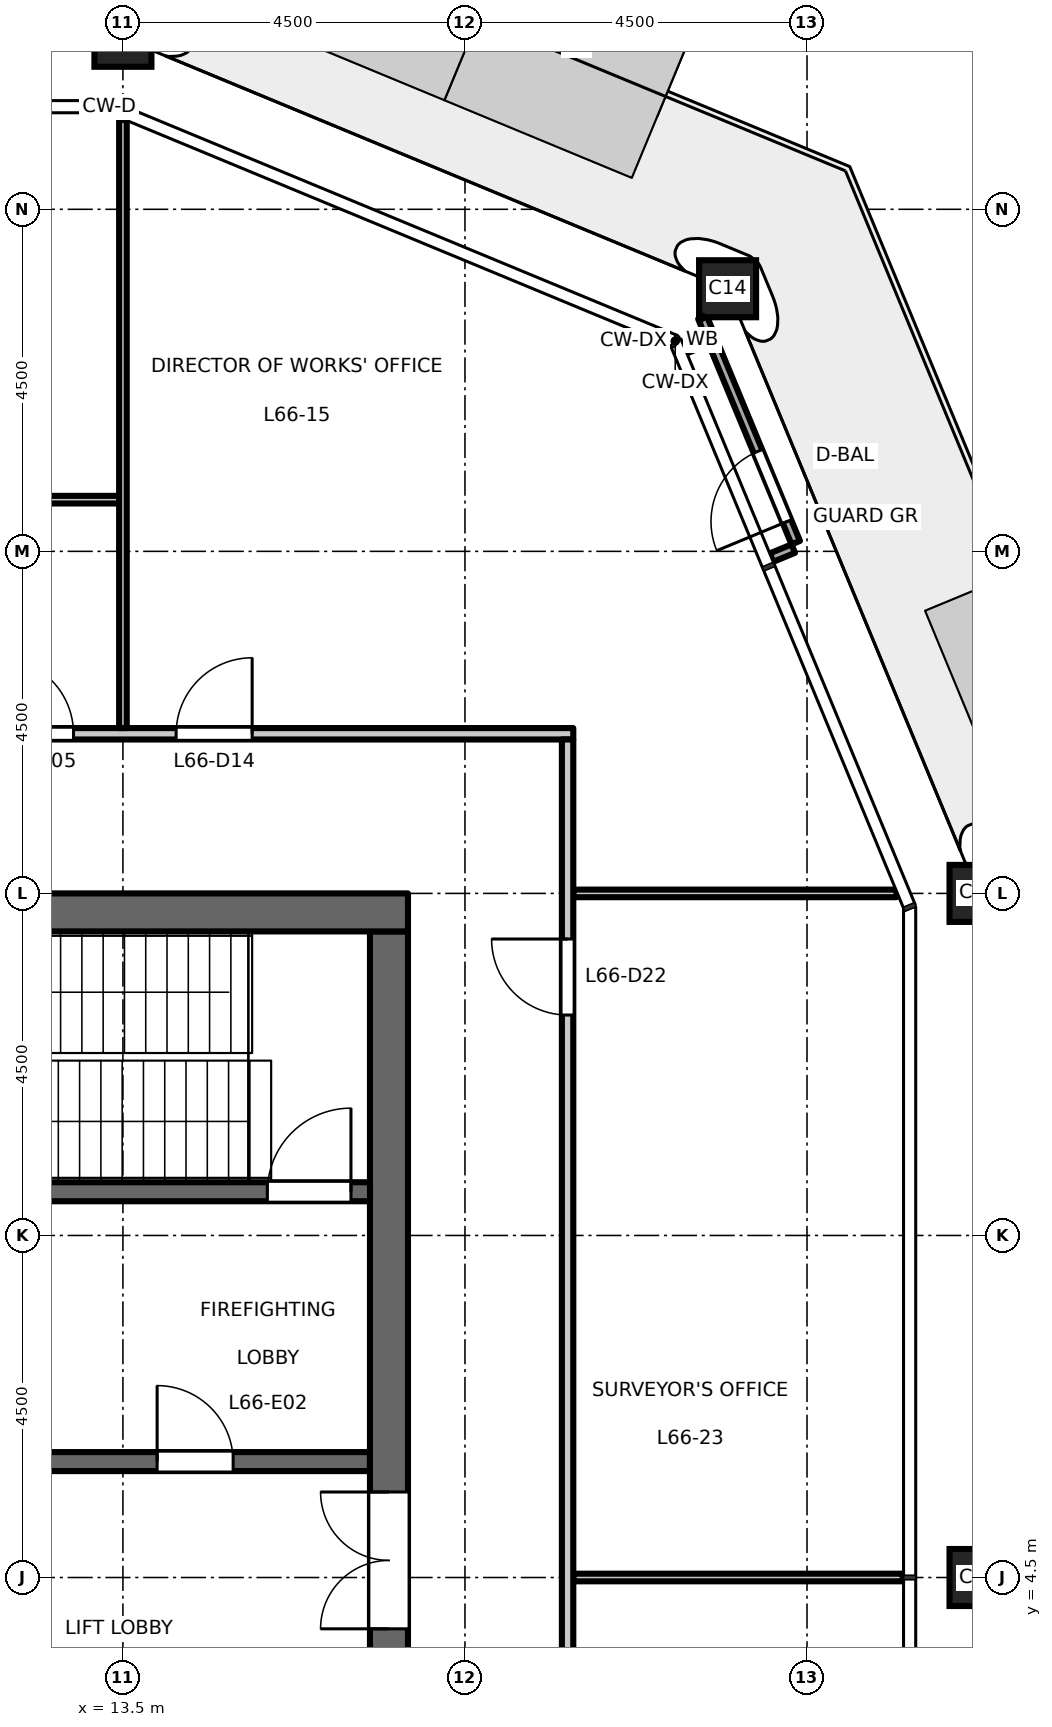
"""IFC4 building model, lengths in metres.
Left out: names, types, materials, properties, quantities, classifications, styles, units other than length and angle.
Written with IfcOpenShell. Run it as: python <this file> out.ifc"""

import sys

from ifc_helpers import new_model, si_unit, direction, frame, frame_2d, origin, origin_2d, place, context, subcontext, project, spatial, rectangle, hollow_rectangle, extrude, element, fill, save


model = new_model("IFC4")
c1 = context("Model", 3, precision=1e-05, world=origin(), true_north=direction((0.0, 1.0)))
c2 = subcontext(c1, "Body", "Model", "MODEL_VIEW")
j1 = project(units=[si_unit("LENGTHUNIT", "METRE"), si_unit("PLANEANGLEUNIT", "RADIAN")], contexts=[c1])
p1 = place(None, origin())
s1 = spatial("IfcSite", under=j1, at=p1, CompositionType="ELEMENT")
p2 = place(p1, origin())
s2 = spatial("IfcBuilding", under=s1, at=p2, CompositionType="ELEMENT")
p3 = place(p2, frame((0.0, 0.0, 307.7)))
s3 = spatial("IfcBuildingStorey", under=s2, at=p3, CompositionType="ELEMENT", Elevation=307.7)
for number, where, z_axis, x_axis in (
    (1, (24.75, 4.5, 0.0), (0.0, 0.0, 1.0), (1.0, 0.0, 0.0)),
    (2, (24.75, 13.5, 0.0), (0.0, 0.0, 1.0), (1.0, 0.0, 0.0)),
    (3, (21.455, 21.455, 0.0), (0.0, 0.0, 1.0), (1.0, 0.0, 0.0)),
    (4, (13.5, 24.75, 0.0), (0.0, 0.0, 1.0), (1.0, 0.0, 0.0)),
):
    element("IfcColumn", number, at=place(p3, frame(where, z_axis=z_axis, x_axis=x_axis)), inside=s3, PredefinedType="COLUMN", context=c2, shape_type="SweptSolid", body=[
        extrude(hollow_rectangle(XDim=0.75, YDim=0.75, WallThickness=0.04, at=origin_2d()), origin(), (0.0, 0.0, 1.0), 4.5),
    ])
p4 = place(p3, frame((12.15, 6.025, 0.0), z_axis=(0.0, 0.0, 1.0), x_axis=(1.0, 0.0, 0.0)))
e5 = element("IfcWall", 5, at=p4, inside=s3, PredefinedType="SHEAR", context=c2, shape_type="SweptSolid", body=[
    extrude(rectangle(XDim=4.6, YDim=0.25, at=frame_2d((2.3, 0.0))), origin(), (0.0, 0.0, 1.0), 4.35),
])
p5 = place(p4, frame((1.8, 0.0, 0.0)))
e6 = element("IfcOpeningElement", 6, at=p5, cuts=e5, PredefinedType="OPENING", context=c2, shape_type="SweptSolid", body=[
    extrude(rectangle(XDim=1.0, YDim=2.1, at=frame_2d((0.5, 1.05))), frame((0.0, 0.135, 0.0), z_axis=(0.0, -1.0, 0.0), x_axis=(1.0, 0.0, 0.0)), (0.0, 0.0, 1.0), 0.27),
])
p6 = place(p3, frame((17.0, -13.0, 0.0), z_axis=(0.0, 0.0, 1.0), x_axis=(0.0, 1.0, 0.0)))
e7 = element("IfcWall", 7, at=p6, inside=s3, PredefinedType="SHEAR", context=c2, shape_type="SweptSolid", body=[
    extrude(rectangle(XDim=26.0, YDim=0.5, at=frame_2d((13.0, 0.0))), origin(), (0.0, 0.0, 1.0), 4.35),
])
p7 = place(p6, frame((16.825, 0.0, 0.0)))
e8 = element("IfcOpeningElement", 8, at=p7, cuts=e7, PredefinedType="OPENING", context=c2, shape_type="SweptSolid", body=[
    extrude(rectangle(XDim=1.8, YDim=2.1, at=frame_2d((0.9, 1.05))), frame((0.0, 0.26, 0.0), z_axis=(0.0, -1.0, 0.0), x_axis=(1.0, 0.0, 0.0)), (0.0, 0.0, 1.0), 0.52),
])
p8 = place(p6, frame((7.375, 0.0, 0.0)))
e9 = element("IfcOpeningElement", 9, at=p8, cuts=e7, PredefinedType="OPENING", context=c2, shape_type="SweptSolid", body=[
    extrude(rectangle(XDim=1.8, YDim=2.1, at=frame_2d((0.9, 1.05))), frame((0.0, 0.26, 0.0), z_axis=(0.0, -1.0, 0.0), x_axis=(1.0, 0.0, 0.0)), (0.0, 0.0, 1.0), 0.52),
])
p9 = place(p3, frame((8.75, 9.575, 0.0), z_axis=(0.0, 0.0, 1.0), x_axis=(1.0, 0.0, 0.0)))
e10 = element("IfcWall", 10, at=p9, inside=s3, PredefinedType="SHEAR", context=c2, shape_type="SweptSolid", body=[
    extrude(rectangle(XDim=8.0, YDim=0.25, at=frame_2d((4.0, 0.0))), origin(), (0.0, 0.0, 1.0), 4.35),
])
p10 = place(p9, frame((6.65, 0.0, 0.0)))
e11 = element("IfcOpeningElement", 11, at=p10, cuts=e10, PredefinedType="OPENING", context=c2, shape_type="SweptSolid", body=[
    extrude(rectangle(XDim=1.1, YDim=2.1, at=frame_2d((0.55, 1.05))), frame((0.0, 0.135, 0.0), z_axis=(0.0, -1.0, 0.0), x_axis=(1.0, 0.0, 0.0)), (0.0, 0.0, 1.0), 0.27),
])
p11 = place(p3, frame((8.25, 13.25, 0.0), z_axis=(0.0, 0.0, 1.0), x_axis=(1.0, 0.0, 0.0)))
e12 = element("IfcWall", 12, at=p11, inside=s3, PredefinedType="SHEAR", context=c2, shape_type="SweptSolid", body=[
    extrude(rectangle(XDim=9.0, YDim=0.5, at=frame_2d((4.5, 0.0))), origin(), (0.0, 0.0, 1.0), 4.35),
])
p12 = place(p3, frame((22.033, 17.917, 0.0), z_axis=(0.0, 0.0, 1.0), x_axis=(0.923844027884, 0.382769136873, 0.0)))
e13 = element("IfcWall", 13, at=p12, inside=s3, PredefinedType="STANDARD", context=c2, shape_type="SweptSolid", body=[
    extrude(rectangle(XDim=0.31, YDim=0.12, at=frame_2d((0.155, 0.0))), origin(), (0.0, 0.0, 1.0), 4.35),
])
p13 = place(p3, frame((20.896, 20.66, 0.0), z_axis=(0.0, 0.0, 1.0), x_axis=(0.923959293734, 0.382490814953, 0.0)))
e14 = element("IfcWall", 14, at=p13, inside=s3, PredefinedType="STANDARD", context=c2, shape_type="SweptSolid", body=[
    extrude(rectangle(XDim=0.31, YDim=0.12, at=frame_2d((0.155, 0.0))), origin(), (0.0, 0.0, 1.0), 4.35),
])
p14 = place(p3, frame((22.352, 18.115, 0.0), z_axis=(0.0, 0.0, 1.0), x_axis=(-0.382680969843, 0.923880552517, 0.0)))
e15 = element("IfcWall", 15, at=p14, inside=s3, PredefinedType="STANDARD", context=c2, shape_type="SweptSolid", body=[
    extrude(rectangle(XDim=3.21, YDim=0.12, at=frame_2d((1.605, 0.0))), origin(), (0.0, 0.0, 1.0), 4.35),
])
p15 = place(p14, frame((0.3, 0.0, 0.0)))
e16 = element("IfcOpeningElement", 16, at=p15, cuts=e15, PredefinedType="OPENING", context=c2, shape_type="SweptSolid", body=[
    extrude(rectangle(XDim=1.0, YDim=2.4, at=frame_2d((0.5, 1.2))), frame((0.0, 0.07, 0.0), z_axis=(0.0, -1.0, 0.0), x_axis=(1.0, 0.0, 0.0)), (0.0, 0.0, 1.0), 0.14),
])
p16 = place(p3, frame((19.425, 4.5, 0.0), z_axis=(0.0, 0.0, 1.0), x_axis=(1.0, 0.0, 0.0)))
e17 = element("IfcWall", 17, at=p16, inside=s3, PredefinedType="PARTITIONING", context=c2, shape_type="SweptSolid", body=[
    extrude(rectangle(XDim=4.335, YDim=0.1, at=frame_2d((2.167, 0.0))), origin(), (0.0, 0.0, 1.0), 4.35),
])
p17 = place(p3, frame((19.425, 13.5, 0.0), z_axis=(0.0, 0.0, 1.0), x_axis=(1.0, 0.0, 0.0)))
e18 = element("IfcWall", 18, at=p17, inside=s3, PredefinedType="PARTITIONING", context=c2, shape_type="SweptSolid", body=[
    extrude(rectangle(XDim=4.253, YDim=0.1, at=frame_2d((2.126, 0.0))), origin(), (0.0, 0.0, 1.0), 4.35),
])
p18 = place(p3, frame((-19.425, 15.6, 0.0), z_axis=(0.0, 0.0, 1.0), x_axis=(1.0, 0.0, 0.0)))
e19 = element("IfcWall", 19, at=p18, inside=s3, PredefinedType="PARTITIONING", context=c2, shape_type="SweptSolid", body=[
    extrude(rectangle(XDim=38.85, YDim=0.15, at=frame_2d((19.425, 0.0))), origin(), (0.0, 0.0, 1.0), 4.35),
])
p19 = place(p18, frame((13.275, 0.0, 0.0)))
e20 = element("IfcOpeningElement", 20, at=p19, cuts=e19, PredefinedType="OPENING", context=c2, shape_type="SweptSolid", body=[
    extrude(rectangle(XDim=1.0, YDim=2.1, at=frame_2d((0.5, 1.05))), frame((0.0, 0.085, 0.0), z_axis=(0.0, -1.0, 0.0), x_axis=(1.0, 0.0, 0.0)), (0.0, 0.0, 1.0), 0.17),
])
p20 = place(p18, frame((15.525, 0.0, 0.0)))
e21 = element("IfcOpeningElement", 21, at=p20, cuts=e19, PredefinedType="OPENING", context=c2, shape_type="SweptSolid", body=[
    extrude(rectangle(XDim=1.0, YDim=2.1, at=frame_2d((0.5, 1.05))), frame((0.0, 0.085, 0.0), z_axis=(0.0, -1.0, 0.0), x_axis=(1.0, 0.0, 0.0)), (0.0, 0.0, 1.0), 0.17),
])
p21 = place(p18, frame((31.275, 0.0, 0.0)))
e22 = element("IfcOpeningElement", 22, at=p21, cuts=e19, PredefinedType="OPENING", context=c2, shape_type="SweptSolid", body=[
    extrude(rectangle(XDim=1.0, YDim=2.1, at=frame_2d((0.5, 1.05))), frame((0.0, 0.085, 0.0), z_axis=(0.0, -1.0, 0.0), x_axis=(1.0, 0.0, 0.0)), (0.0, 0.0, 1.0), 0.17),
])
p22 = place(p18, frame((33.625, 0.0, 0.0)))
e23 = element("IfcOpeningElement", 23, at=p22, cuts=e19, PredefinedType="OPENING", context=c2, shape_type="SweptSolid", body=[
    extrude(rectangle(XDim=1.0, YDim=2.1, at=frame_2d((0.5, 1.05))), frame((0.0, 0.085, 0.0), z_axis=(0.0, -1.0, 0.0), x_axis=(1.0, 0.0, 0.0)), (0.0, 0.0, 1.0), 0.17),
])
p23 = place(p3, frame((4.55, 18.68, 0.0), z_axis=(0.0, 0.0, 1.0), x_axis=(1.0, 0.0, 0.0)))
e24 = element("IfcWall", 24, at=p23, inside=s3, PredefinedType="PARTITIONING", context=c2, shape_type="SweptSolid", body=[
    extrude(rectangle(XDim=8.9, YDim=0.1, at=frame_2d((4.45, 0.0))), origin(), (0.0, 0.0, 1.0), 4.35),
])
p24 = place(p23, frame((0.55, 0.0, 0.0)))
e25 = element("IfcOpeningElement", 25, at=p24, cuts=e24, PredefinedType="OPENING", context=c2, shape_type="SweptSolid", body=[
    extrude(rectangle(XDim=1.0, YDim=2.1, at=frame_2d((0.5, 1.05))), frame((0.0, 0.06, 0.0), z_axis=(0.0, -1.0, 0.0), x_axis=(1.0, 0.0, 0.0)), (0.0, 0.0, 1.0), 0.12),
])
p25 = place(p3, frame((13.5, 15.675, 0.0), z_axis=(0.0, 0.0, 1.0), x_axis=(0.0, 1.0, 0.0)))
e26 = element("IfcWall", 26, at=p25, inside=s3, PredefinedType="PARTITIONING", context=c2, shape_type="SweptSolid", body=[
    extrude(rectangle(XDim=8.003, YDim=0.1, at=frame_2d((4.001, 0.0))), origin(), (0.0, 0.0, 1.0), 3.75),
])
p26 = place(p3, frame((19.35, -15.525, 0.0), z_axis=(0.0, 0.0, 1.0), x_axis=(0.0, 1.0, 0.0)))
e27 = element("IfcWall", 27, at=p26, inside=s3, PredefinedType="PARTITIONING", context=c2, shape_type="SweptSolid", body=[
    extrude(rectangle(XDim=31.05, YDim=0.15, at=frame_2d((15.525, 0.0))), origin(), (0.0, 0.0, 1.0), 4.35),
])
p27 = place(p26, frame((9.425, 0.0, 0.0)))
e28 = element("IfcOpeningElement", 28, at=p27, cuts=e27, PredefinedType="OPENING", context=c2, shape_type="SweptSolid", body=[
    extrude(rectangle(XDim=1.0, YDim=2.1, at=frame_2d((0.5, 1.05))), frame((0.0, 0.085, 0.0), z_axis=(0.0, -1.0, 0.0), x_axis=(1.0, 0.0, 0.0)), (0.0, 0.0, 1.0), 0.17),
])
p28 = place(p26, frame((11.675, 0.0, 0.0)))
e29 = element("IfcOpeningElement", 29, at=p28, cuts=e27, PredefinedType="OPENING", context=c2, shape_type="SweptSolid", body=[
    extrude(rectangle(XDim=1.0, YDim=2.1, at=frame_2d((0.5, 1.05))), frame((0.0, 0.085, 0.0), z_axis=(0.0, -1.0, 0.0), x_axis=(1.0, 0.0, 0.0)), (0.0, 0.0, 1.0), 0.17),
])
p29 = place(p26, frame((27.425, 0.0, 0.0)))
e30 = element("IfcOpeningElement", 30, at=p29, cuts=e27, PredefinedType="OPENING", context=c2, shape_type="SweptSolid", body=[
    extrude(rectangle(XDim=1.0, YDim=2.1, at=frame_2d((0.5, 1.05))), frame((0.0, 0.085, 0.0), z_axis=(0.0, -1.0, 0.0), x_axis=(1.0, 0.0, 0.0)), (0.0, 0.0, 1.0), 0.17),
])
p30 = place(p5, origin())
e31 = element("IfcDoor", 31, at=p30, inside=s3, OperationType="SINGLE_SWING_RIGHT", PredefinedType="DOOR", context=c2, shape_type="SweptSolid", body=[
    extrude(rectangle(XDim=1.0, YDim=2.1, at=frame_2d((0.5, 1.05))), frame((0.0, 0.025, 0.0), z_axis=(0.0, -1.0, 0.0), x_axis=(1.0, 0.0, 0.0)), (0.0, 0.0, 1.0), 0.05),
])
fill(e6, e31)
p31 = place(p10, origin())
e32 = element("IfcDoor", 32, at=p31, inside=s3, OperationType="SINGLE_SWING_LEFT", PredefinedType="DOOR", context=c2, shape_type="SweptSolid", body=[
    extrude(rectangle(XDim=1.1, YDim=2.1, at=frame_2d((0.55, 1.05))), frame((0.0, 0.025, 0.0), z_axis=(0.0, -1.0, 0.0), x_axis=(1.0, 0.0, 0.0)), (0.0, 0.0, 1.0), 0.05),
])
fill(e11, e32)
p32 = place(p7, origin())
e33 = element("IfcDoor", 33, at=p32, inside=s3, OperationType="DOUBLE_DOOR_DOUBLE_SWING", PredefinedType="DOOR", context=c2, shape_type="SweptSolid", body=[
    extrude(rectangle(XDim=1.8, YDim=2.1, at=frame_2d((0.9, 1.05))), frame((0.0, 0.025, 0.0), z_axis=(0.0, -1.0, 0.0), x_axis=(1.0, 0.0, 0.0)), (0.0, 0.0, 1.0), 0.05),
])
fill(e8, e33)
p33 = place(p15, origin())
e34 = element("IfcDoor", 34, at=p33, inside=s3, OperationType="SINGLE_SWING_LEFT", PredefinedType="DOOR", context=c2, shape_type="SweptSolid", body=[
    extrude(rectangle(XDim=1.0, YDim=2.4, at=frame_2d((0.5, 1.2))), frame((0.0, 0.025, 0.0), z_axis=(0.0, -1.0, 0.0), x_axis=(1.0, 0.0, 0.0)), (0.0, 0.0, 1.0), 0.05),
])
fill(e16, e34)
p34 = place(p21, origin())
e35 = element("IfcDoor", 35, at=p34, inside=s3, OperationType="SINGLE_SWING_LEFT", PredefinedType="DOOR", context=c2, shape_type="SweptSolid", body=[
    extrude(rectangle(XDim=1.0, YDim=2.1, at=frame_2d((0.5, 1.05))), frame((0.0, 0.025, 0.0), z_axis=(0.0, -1.0, 0.0), x_axis=(1.0, 0.0, 0.0)), (0.0, 0.0, 1.0), 0.05),
])
fill(e22, e35)
p35 = place(p22, origin())
e36 = element("IfcDoor", 36, at=p35, inside=s3, OperationType="SINGLE_SWING_RIGHT", PredefinedType="DOOR", context=c2, shape_type="SweptSolid", body=[
    extrude(rectangle(XDim=1.0, YDim=2.1, at=frame_2d((0.5, 1.05))), frame((0.0, 0.025, 0.0), z_axis=(0.0, -1.0, 0.0), x_axis=(1.0, 0.0, 0.0)), (0.0, 0.0, 1.0), 0.05),
])
fill(e23, e36)
p36 = place(p29, origin())
e37 = element("IfcDoor", 37, at=p36, inside=s3, OperationType="SINGLE_SWING_RIGHT", PredefinedType="DOOR", context=c2, shape_type="SweptSolid", body=[
    extrude(rectangle(XDim=1.0, YDim=2.1, at=frame_2d((0.5, 1.05))), frame((0.0, 0.025, 0.0), z_axis=(0.0, -1.0, 0.0), x_axis=(1.0, 0.0, 0.0)), (0.0, 0.0, 1.0), 0.05),
])
fill(e30, e37)
save(model, sys.argv[1])
